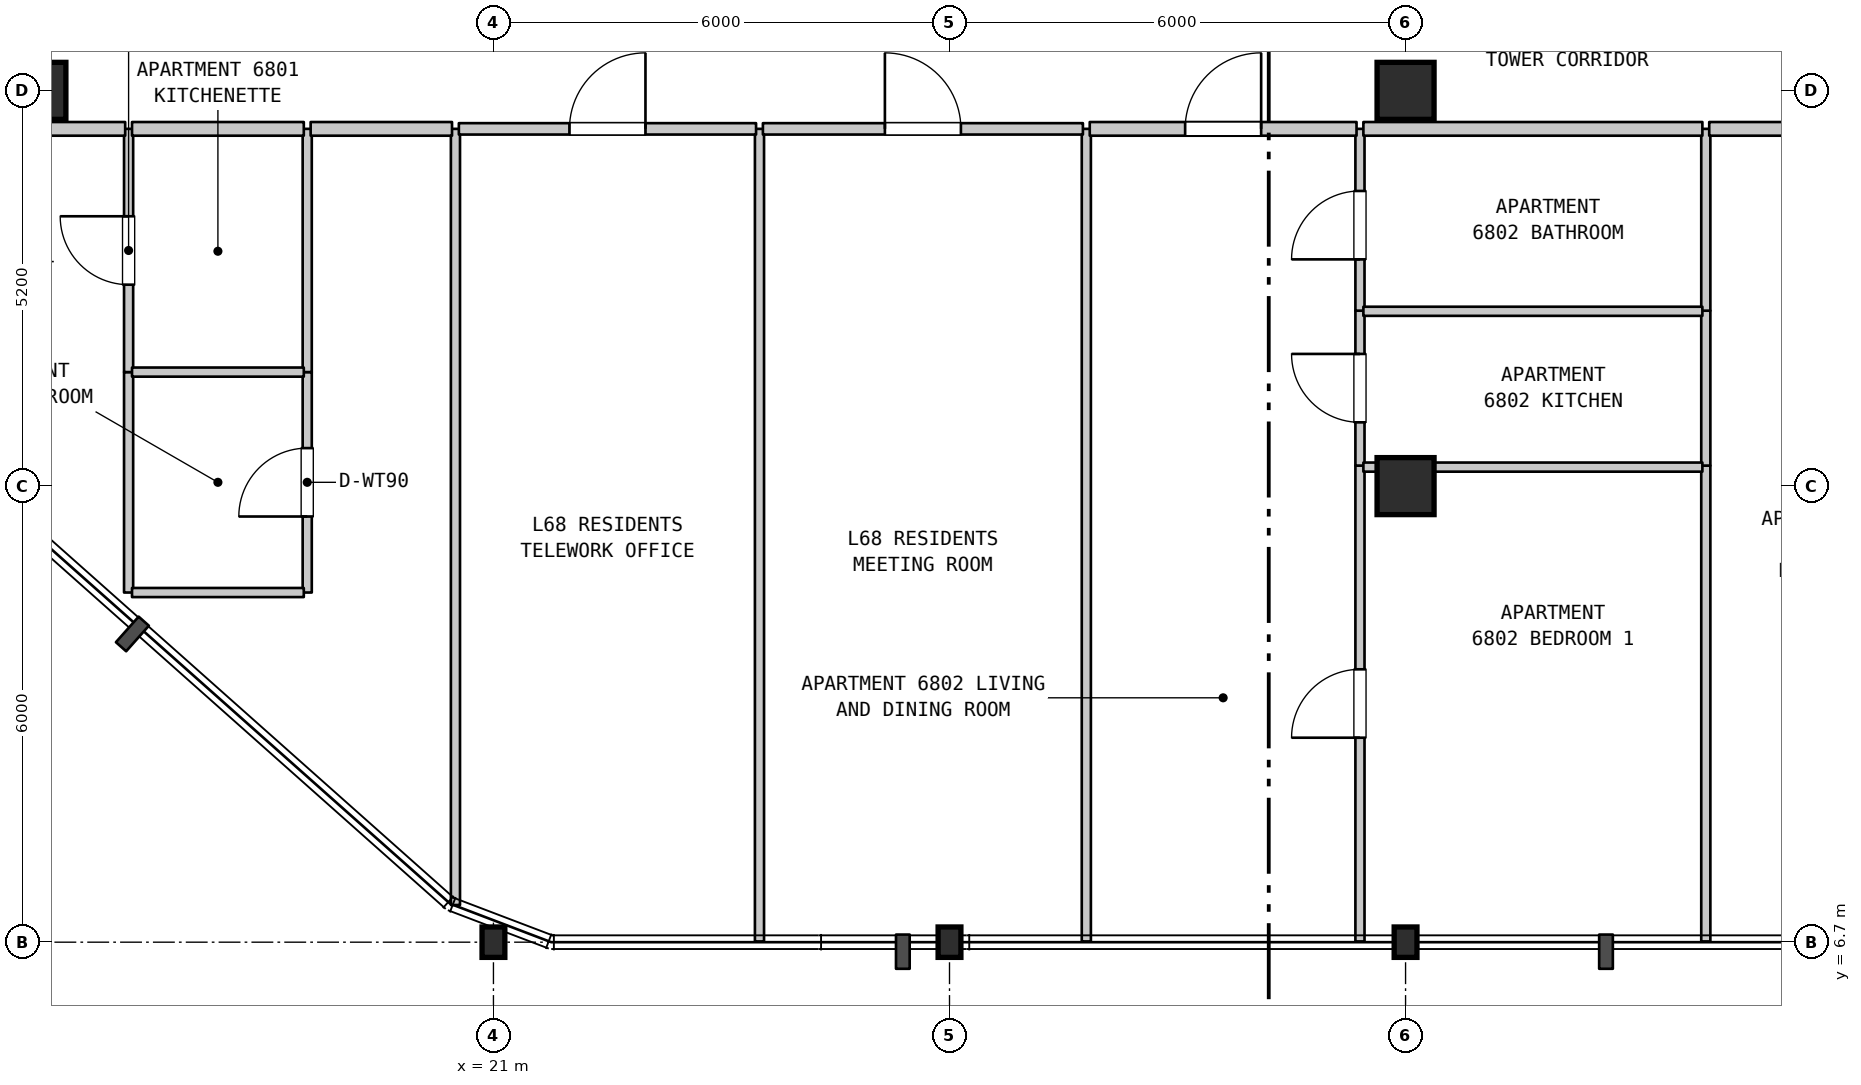
"""IFC4 building model, lengths in metres.
Left out: names, types, materials, properties, quantities, classifications, styles, units other than length and angle.
Written with IfcOpenShell. Run it as: python <this file> out.ifc"""

import sys

from ifc_helpers import new_model, si_unit, direction, frame, frame_2d, origin, origin_2d, place, context, subcontext, project, spatial, rectangle, i_section, extrude, element, fill, save


model = new_model("IFC4")
c1 = context("Model", 3, precision=1e-05, world=origin(), true_north=direction((0.0, 1.0)))
c2 = subcontext(c1, "Body", "Model", "MODEL_VIEW")
j1 = project(units=[si_unit("LENGTHUNIT", "METRE"), si_unit("PLANEANGLEUNIT", "RADIAN")], contexts=[c1])
p1 = place(None, origin())
s1 = spatial("IfcSite", under=j1, at=p1, CompositionType="ELEMENT")
p2 = place(p1, origin())
s2 = spatial("IfcBuilding", under=s1, at=p2, CompositionType="ELEMENT")
p3 = place(p2, frame((0.0, 0.0, 273.2)))
s3 = spatial("IfcBuildingStorey", under=s2, at=p3, CompositionType="ELEMENT", Elevation=273.2)
p4 = place(p3, frame((15.0, 17.9, 0.0), z_axis=(0.0, 0.0, 1.0), x_axis=(1.0, 0.0, 0.0)))
e1 = element("IfcColumn", 1, at=p4, inside=s3, PredefinedType="COLUMN", context=c2, shape_type="SweptSolid", body=[
    extrude(rectangle(XDim=0.75, YDim=0.75, at=origin_2d()), origin(), (0.0, 0.0, 1.0), 3.7),
])
for number, where, z_axis, x_axis in (
    (2, (21.0, 6.7, 0.0), (0.0, 0.0, 1.0), (1.0, 0.0, 0.0)),
    (3, (27.0, 6.7, 0.0), (0.0, 0.0, 1.0), (1.0, 0.0, 0.0)),
    (4, (33.0, 6.7, 0.0), (0.0, 0.0, 1.0), (1.0, 0.0, 0.0)),
):
    element("IfcColumn", number, at=place(p3, frame(where, z_axis=z_axis, x_axis=x_axis)), inside=s3, PredefinedType="COLUMN", context=c2, shape_type="SweptSolid", body=[
        extrude(i_section(OverallWidth=0.3, OverallDepth=0.4, WebThickness=0.013, FlangeThickness=0.024, FilletRadius=0.027, at=origin_2d()), origin(), (0.0, 0.0, 1.0), 3.7),
    ])
for number, where, z_axis, x_axis in (
    (5, (33.0, 12.7, 0.0), (0.0, 0.0, 1.0), (1.0, 0.0, 0.0)),
    (6, (33.0, 17.9, 0.0), (0.0, 0.0, 1.0), (1.0, 0.0, 0.0)),
):
    element("IfcColumn", number, at=place(p3, frame(where, z_axis=z_axis, x_axis=x_axis)), inside=s3, PredefinedType="COLUMN", context=c2, shape_type="SweptSolid", body=[
        extrude(rectangle(XDim=0.75, YDim=0.75, at=origin_2d()), origin(), (0.0, 0.0, 1.0), 3.7),
    ])
p5 = place(p3, frame((16.2, 11.3, 0.0), z_axis=(0.0, 0.0, 1.0), x_axis=(0.0, 1.0, 0.0)))
e7 = element("IfcWall", 7, at=p5, inside=s3, PredefinedType="PARTITIONING", context=c2, shape_type="SweptSolid", body=[
    extrude(rectangle(XDim=2.9, YDim=0.12, at=frame_2d((1.45, 0.0))), origin(), (0.0, 0.0, 1.0), 3.39),
])
p6 = place(p3, frame((16.2, 14.2, 0.0), z_axis=(0.0, 0.0, 1.0), x_axis=(0.0, 1.0, 0.0)))
e8 = element("IfcWall", 8, at=p6, inside=s3, PredefinedType="PARTITIONING", context=c2, shape_type="SweptSolid", body=[
    extrude(rectangle(XDim=3.2, YDim=0.12, at=frame_2d((1.6, 0.0))), origin(), (0.0, 0.0, 1.0), 3.39),
])
p7 = place(p6, frame((1.15, 0.0, 0.0)))
e9 = element("IfcOpeningElement", 9, at=p7, cuts=e8, PredefinedType="OPENING", context=c2, shape_type="SweptSolid", body=[
    extrude(rectangle(XDim=0.9, YDim=2.15, at=frame_2d((0.45, 1.075))), frame((0.0, 0.07, 0.0), z_axis=(0.0, -1.0, 0.0), x_axis=(1.0, 0.0, 0.0)), (0.0, 0.0, 1.0), 0.14),
])
p8 = place(p3, frame((18.55, 11.3, 0.0), z_axis=(0.0, 0.0, 1.0), x_axis=(0.0, 1.0, 0.0)))
e10 = element("IfcWall", 10, at=p8, inside=s3, PredefinedType="PARTITIONING", context=c2, shape_type="SweptSolid", body=[
    extrude(rectangle(XDim=2.9, YDim=0.12, at=frame_2d((1.45, 0.0))), origin(), (0.0, 0.0, 1.0), 3.39),
])
p9 = place(p8, frame((1.0, 0.0, 0.0)))
e11 = element("IfcOpeningElement", 11, at=p9, cuts=e10, PredefinedType="OPENING", context=c2, shape_type="SweptSolid", body=[
    extrude(rectangle(XDim=0.9, YDim=2.1, at=frame_2d((0.45, 1.05))), frame((0.0, 0.07, 0.0), z_axis=(0.0, -1.0, 0.0), x_axis=(1.0, 0.0, 0.0)), (0.0, 0.0, 1.0), 0.14),
])
p10 = place(p3, frame((18.55, 14.2, 0.0), z_axis=(0.0, 0.0, 1.0), x_axis=(0.0, 1.0, 0.0)))
e12 = element("IfcWall", 12, at=p10, inside=s3, PredefinedType="PARTITIONING", context=c2, shape_type="SweptSolid", body=[
    extrude(rectangle(XDim=3.2, YDim=0.12, at=frame_2d((1.6, 0.0))), origin(), (0.0, 0.0, 1.0), 3.39),
])
p11 = place(p3, frame((20.5, 7.189, 0.0), z_axis=(0.0, 0.0, 1.0), x_axis=(0.0, 1.0, 0.0)))
e13 = element("IfcWall", 13, at=p11, inside=s3, PredefinedType="PARTITIONING", context=c2, shape_type="SweptSolid", body=[
    extrude(rectangle(XDim=10.211, YDim=0.12, at=frame_2d((5.105, 0.0))), origin(), (0.0, 0.0, 1.0), 3.39),
])
for number, where, z_axis, x_axis in (
    (14, (24.5, 6.71, 0.0), (0.0, 0.0, 1.0), (0.0, 1.0, 0.0)),
    (15, (28.8, 6.71, 0.0), (0.0, 0.0, 1.0), (0.0, 1.0, 0.0)),
):
    element("IfcWall", number, at=place(p3, frame(where, z_axis=z_axis, x_axis=x_axis)), inside=s3, PredefinedType="PARTITIONING", context=c2, shape_type="SweptSolid", body=[
        extrude(rectangle(XDim=10.69, YDim=0.12, at=frame_2d((5.345, 0.0))), origin(), (0.0, 0.0, 1.0), 3.39),
    ])
p12 = place(p3, frame((32.4, 6.71, 0.0), z_axis=(0.0, 0.0, 1.0), x_axis=(0.0, 1.0, 0.0)))
e16 = element("IfcWall", 16, at=p12, inside=s3, PredefinedType="PARTITIONING", context=c2, shape_type="SweptSolid", body=[
    extrude(rectangle(XDim=6.26, YDim=0.12, at=frame_2d((3.13, 0.0))), origin(), (0.0, 0.0, 1.0), 3.39),
])
p13 = place(p12, frame((2.68, 0.0, 0.0)))
e17 = element("IfcOpeningElement", 17, at=p13, cuts=e16, PredefinedType="OPENING", context=c2, shape_type="SweptSolid", body=[
    extrude(rectangle(XDim=0.9, YDim=2.15, at=frame_2d((0.45, 1.075))), frame((0.0, 0.07, 0.0), z_axis=(0.0, -1.0, 0.0), x_axis=(1.0, 0.0, 0.0)), (0.0, 0.0, 1.0), 0.14),
])
p14 = place(p3, frame((32.4, 12.97, 0.0), z_axis=(0.0, 0.0, 1.0), x_axis=(0.0, 1.0, 0.0)))
e18 = element("IfcWall", 18, at=p14, inside=s3, PredefinedType="PARTITIONING", context=c2, shape_type="SweptSolid", body=[
    extrude(rectangle(XDim=2.038, YDim=0.12, at=frame_2d((1.019, 0.0))), origin(), (0.0, 0.0, 1.0), 3.39),
])
p15 = place(p14, frame((0.569, 0.0, 0.0)))
e19 = element("IfcOpeningElement", 19, at=p15, cuts=e18, PredefinedType="OPENING", context=c2, shape_type="SweptSolid", body=[
    extrude(rectangle(XDim=0.9, YDim=2.15, at=frame_2d((0.45, 1.075))), frame((0.0, 0.07, 0.0), z_axis=(0.0, -1.0, 0.0), x_axis=(1.0, 0.0, 0.0)), (0.0, 0.0, 1.0), 0.14),
])
p16 = place(p3, frame((32.4, 15.008, 0.0), z_axis=(0.0, 0.0, 1.0), x_axis=(0.0, 1.0, 0.0)))
e20 = element("IfcWall", 20, at=p16, inside=s3, PredefinedType="PARTITIONING", context=c2, shape_type="SweptSolid", body=[
    extrude(rectangle(XDim=2.392, YDim=0.12, at=frame_2d((1.196, 0.0))), origin(), (0.0, 0.0, 1.0), 3.39),
])
p17 = place(p16, frame((0.675, 0.0, 0.0)))
e21 = element("IfcOpeningElement", 21, at=p17, cuts=e20, PredefinedType="OPENING", context=c2, shape_type="SweptSolid", body=[
    extrude(rectangle(XDim=0.9, YDim=2.1, at=frame_2d((0.45, 1.05))), frame((0.0, 0.07, 0.0), z_axis=(0.0, -1.0, 0.0), x_axis=(1.0, 0.0, 0.0)), (0.0, 0.0, 1.0), 0.14),
])
p18 = place(p3, frame((36.95, 6.71, 0.0), z_axis=(0.0, 0.0, 1.0), x_axis=(0.0, 1.0, 0.0)))
e22 = element("IfcWall", 22, at=p18, inside=s3, PredefinedType="PARTITIONING", context=c2, shape_type="SweptSolid", body=[
    extrude(rectangle(XDim=6.26, YDim=0.12, at=frame_2d((3.13, 0.0))), origin(), (0.0, 0.0, 1.0), 3.39),
])
p19 = place(p3, frame((36.95, 12.97, 0.0), z_axis=(0.0, 0.0, 1.0), x_axis=(0.0, 1.0, 0.0)))
e23 = element("IfcWall", 23, at=p19, inside=s3, PredefinedType="PARTITIONING", context=c2, shape_type="SweptSolid", body=[
    extrude(rectangle(XDim=2.038, YDim=0.12, at=frame_2d((1.019, 0.0))), origin(), (0.0, 0.0, 1.0), 3.39),
])
p20 = place(p3, frame((36.95, 15.008, 0.0), z_axis=(0.0, 0.0, 1.0), x_axis=(0.0, 1.0, 0.0)))
e24 = element("IfcWall", 24, at=p20, inside=s3, PredefinedType="PARTITIONING", context=c2, shape_type="SweptSolid", body=[
    extrude(rectangle(XDim=2.392, YDim=0.12, at=frame_2d((1.196, 0.0))), origin(), (0.0, 0.0, 1.0), 3.39),
])
p21 = place(p3, frame((16.245, 11.3, 0.0), z_axis=(0.0, 0.0, 1.0), x_axis=(1.0, 0.0, 0.0)))
e25 = element("IfcWall", 25, at=p21, inside=s3, PredefinedType="PARTITIONING", context=c2, shape_type="SweptSolid", body=[
    extrude(rectangle(XDim=2.26, YDim=0.12, at=frame_2d((1.13, 0.0))), origin(), (0.0, 0.0, 1.0), 3.39),
])
p22 = place(p3, frame((32.445, 12.95, 0.0), z_axis=(0.0, 0.0, 1.0), x_axis=(1.0, 0.0, 0.0)))
e26 = element("IfcWall", 26, at=p22, inside=s3, PredefinedType="PARTITIONING", context=c2, shape_type="SweptSolid", body=[
    extrude(rectangle(XDim=4.46, YDim=0.12, at=frame_2d((2.23, 0.0))), origin(), (0.0, 0.0, 1.0), 3.39),
])
p23 = place(p3, frame((16.245, 14.2, 0.0), z_axis=(0.0, 0.0, 1.0), x_axis=(1.0, 0.0, 0.0)))
e27 = element("IfcWall", 27, at=p23, inside=s3, PredefinedType="PARTITIONING", context=c2, shape_type="SweptSolid", body=[
    extrude(rectangle(XDim=2.26, YDim=0.12, at=frame_2d((1.13, 0.0))), origin(), (0.0, 0.0, 1.0), 3.39),
])
p24 = place(p3, frame((32.445, 15.0, 0.0), z_axis=(0.0, 0.0, 1.0), x_axis=(1.0, 0.0, 0.0)))
e28 = element("IfcWall", 28, at=p24, inside=s3, PredefinedType="PARTITIONING", context=c2, shape_type="SweptSolid", body=[
    extrude(rectangle(XDim=4.46, YDim=0.12, at=frame_2d((2.23, 0.0))), origin(), (0.0, 0.0, 1.0), 3.39),
])
p25 = place(p3, frame((12.975, 17.4, 0.0), z_axis=(0.0, 0.0, 1.0), x_axis=(1.0, 0.0, 0.0)))
e29 = element("IfcWall", 29, at=p25, inside=s3, PredefinedType="STANDARD", context=c2, shape_type="SweptSolid", body=[
    extrude(rectangle(XDim=3.18, YDim=0.18, at=frame_2d((1.59, 0.0))), origin(), (0.0, 0.0, 1.0), 3.39),
])
p26 = place(p25, frame((0.332, 0.0, 0.0)))
e30 = element("IfcOpeningElement", 30, at=p26, cuts=e29, PredefinedType="OPENING", context=c2, shape_type="SweptSolid", body=[
    extrude(rectangle(XDim=1.0, YDim=2.15, at=frame_2d((0.5, 1.075))), frame((0.0, 0.1, 0.0), z_axis=(0.0, -1.0, 0.0), x_axis=(1.0, 0.0, 0.0)), (0.0, 0.0, 1.0), 0.2),
])
p27 = place(p3, frame((16.245, 17.4, 0.0), z_axis=(0.0, 0.0, 1.0), x_axis=(1.0, 0.0, 0.0)))
e31 = element("IfcWall", 31, at=p27, inside=s3, PredefinedType="STANDARD", context=c2, shape_type="SweptSolid", body=[
    extrude(rectangle(XDim=2.26, YDim=0.18, at=frame_2d((1.13, 0.0))), origin(), (0.0, 0.0, 1.0), 3.39),
])
p28 = place(p3, frame((18.595, 17.4, 0.0), z_axis=(0.0, 0.0, 1.0), x_axis=(1.0, 0.0, 0.0)))
e32 = element("IfcWall", 32, at=p28, inside=s3, PredefinedType="STANDARD", context=c2, shape_type="SweptSolid", body=[
    extrude(rectangle(XDim=1.86, YDim=0.18, at=frame_2d((0.93, 0.0))), origin(), (0.0, 0.0, 1.0), 3.39),
])
p29 = place(p3, frame((20.545, 17.4, 0.0), z_axis=(0.0, 0.0, 1.0), x_axis=(1.0, 0.0, 0.0)))
e33 = element("IfcWall", 33, at=p29, inside=s3, PredefinedType="STANDARD", context=c2, shape_type="SweptSolid", body=[
    extrude(rectangle(XDim=3.91, YDim=0.15, at=frame_2d((1.955, 0.0))), origin(), (0.0, 0.0, 1.0), 3.39),
])
p30 = place(p29, frame((1.455, 0.0, 0.0)))
e34 = element("IfcOpeningElement", 34, at=p30, cuts=e33, PredefinedType="OPENING", context=c2, shape_type="SweptSolid", body=[
    extrude(rectangle(XDim=1.0, YDim=2.15, at=frame_2d((0.5, 1.075))), frame((0.0, 0.085, 0.0), z_axis=(0.0, -1.0, 0.0), x_axis=(1.0, 0.0, 0.0)), (0.0, 0.0, 1.0), 0.17),
])
p31 = place(p3, frame((24.545, 17.4, 0.0), z_axis=(0.0, 0.0, 1.0), x_axis=(1.0, 0.0, 0.0)))
e35 = element("IfcWall", 35, at=p31, inside=s3, PredefinedType="STANDARD", context=c2, shape_type="SweptSolid", body=[
    extrude(rectangle(XDim=4.21, YDim=0.15, at=frame_2d((2.105, 0.0))), origin(), (0.0, 0.0, 1.0), 3.39),
])
p32 = place(p31, frame((1.605, 0.0, 0.0)))
e36 = element("IfcOpeningElement", 36, at=p32, cuts=e35, PredefinedType="OPENING", context=c2, shape_type="SweptSolid", body=[
    extrude(rectangle(XDim=1.0, YDim=2.15, at=frame_2d((0.5, 1.075))), frame((0.0, 0.085, 0.0), z_axis=(0.0, -1.0, 0.0), x_axis=(1.0, 0.0, 0.0)), (0.0, 0.0, 1.0), 0.17),
])
p33 = place(p3, frame((28.845, 17.4, 0.0), z_axis=(0.0, 0.0, 1.0), x_axis=(1.0, 0.0, 0.0)))
e37 = element("IfcWall", 37, at=p33, inside=s3, PredefinedType="STANDARD", context=c2, shape_type="SweptSolid", body=[
    extrude(rectangle(XDim=3.51, YDim=0.18, at=frame_2d((1.755, 0.0))), origin(), (0.0, 0.0, 1.0), 3.39),
])
p34 = place(p33, frame((1.255, 0.0, 0.0)))
e38 = element("IfcOpeningElement", 38, at=p34, cuts=e37, PredefinedType="OPENING", context=c2, shape_type="SweptSolid", body=[
    extrude(rectangle(XDim=1.0, YDim=2.15, at=frame_2d((0.5, 1.075))), frame((0.0, 0.1, 0.0), z_axis=(0.0, -1.0, 0.0), x_axis=(1.0, 0.0, 0.0)), (0.0, 0.0, 1.0), 0.2),
])
p35 = place(p3, frame((32.445, 17.4, 0.0), z_axis=(0.0, 0.0, 1.0), x_axis=(1.0, 0.0, 0.0)))
e39 = element("IfcWall", 39, at=p35, inside=s3, PredefinedType="STANDARD", context=c2, shape_type="SweptSolid", body=[
    extrude(rectangle(XDim=4.46, YDim=0.18, at=frame_2d((2.23, 0.0))), origin(), (0.0, 0.0, 1.0), 3.39),
])
p36 = place(p3, frame((36.995, 17.4, 0.0), z_axis=(0.0, 0.0, 1.0), x_axis=(1.0, 0.0, 0.0)))
e40 = element("IfcWall", 40, at=p36, inside=s3, PredefinedType="STANDARD", context=c2, shape_type="SweptSolid", body=[
    extrude(rectangle(XDim=3.51, YDim=0.18, at=frame_2d((1.755, 0.0))), origin(), (0.0, 0.0, 1.0), 3.39),
])
p37 = place(p36, frame((1.255, 0.0, 0.0)))
e41 = element("IfcOpeningElement", 41, at=p37, cuts=e40, PredefinedType="OPENING", context=c2, shape_type="SweptSolid", body=[
    extrude(rectangle(XDim=1.0, YDim=2.15, at=frame_2d((0.5, 1.075))), frame((0.0, 0.1, 0.0), z_axis=(0.0, -1.0, 0.0), x_axis=(1.0, 0.0, 0.0)), (0.0, 0.0, 1.0), 0.2),
])
p38 = place(p7, origin())
e42 = element("IfcDoor", 42, at=p38, inside=s3, OperationType="SINGLE_SWING_RIGHT", PredefinedType="DOOR", context=c2, shape_type="SweptSolid", body=[
    extrude(rectangle(XDim=0.9, YDim=2.15, at=frame_2d((0.45, 1.075))), frame((0.0, 0.025, 0.0), z_axis=(0.0, -1.0, 0.0), x_axis=(1.0, 0.0, 0.0)), (0.0, 0.0, 1.0), 0.05),
])
fill(e9, e42)
p39 = place(p9, origin())
e43 = element("IfcDoor", 43, at=p39, inside=s3, OperationType="SINGLE_SWING_LEFT", PredefinedType="DOOR", context=c2, shape_type="SweptSolid", body=[
    extrude(rectangle(XDim=0.9, YDim=2.1, at=frame_2d((0.45, 1.05))), frame((0.0, 0.025, 0.0), z_axis=(0.0, -1.0, 0.0), x_axis=(1.0, 0.0, 0.0)), (0.0, 0.0, 1.0), 0.05),
])
fill(e11, e43)
p40 = place(p13, origin())
e44 = element("IfcDoor", 44, at=p40, inside=s3, OperationType="SINGLE_SWING_LEFT", PredefinedType="DOOR", context=c2, shape_type="SweptSolid", body=[
    extrude(rectangle(XDim=0.9, YDim=2.15, at=frame_2d((0.45, 1.075))), frame((0.0, 0.025, 0.0), z_axis=(0.0, -1.0, 0.0), x_axis=(1.0, 0.0, 0.0)), (0.0, 0.0, 1.0), 0.05),
])
fill(e17, e44)
p41 = place(p15, origin())
e45 = element("IfcDoor", 45, at=p41, inside=s3, OperationType="SINGLE_SWING_RIGHT", PredefinedType="DOOR", context=c2, shape_type="SweptSolid", body=[
    extrude(rectangle(XDim=0.9, YDim=2.15, at=frame_2d((0.45, 1.075))), frame((0.0, 0.025, 0.0), z_axis=(0.0, -1.0, 0.0), x_axis=(1.0, 0.0, 0.0)), (0.0, 0.0, 1.0), 0.05),
])
fill(e19, e45)
p42 = place(p17, origin())
e46 = element("IfcDoor", 46, at=p42, inside=s3, OperationType="SINGLE_SWING_LEFT", PredefinedType="DOOR", context=c2, shape_type="SweptSolid", body=[
    extrude(rectangle(XDim=0.9, YDim=2.1, at=frame_2d((0.45, 1.05))), frame((0.0, 0.025, 0.0), z_axis=(0.0, -1.0, 0.0), x_axis=(1.0, 0.0, 0.0)), (0.0, 0.0, 1.0), 0.05),
])
fill(e21, e46)
p43 = place(p30, origin())
e47 = element("IfcDoor", 47, at=p43, inside=s3, OperationType="SINGLE_SWING_RIGHT", PredefinedType="DOOR", context=c2, shape_type="SweptSolid", body=[
    extrude(rectangle(XDim=1.0, YDim=2.15, at=frame_2d((0.5, 1.075))), frame((0.0, 0.025, 0.0), z_axis=(0.0, -1.0, 0.0), x_axis=(1.0, 0.0, 0.0)), (0.0, 0.0, 1.0), 0.05),
])
fill(e34, e47)
p44 = place(p32, origin())
e48 = element("IfcDoor", 48, at=p44, inside=s3, OperationType="SINGLE_SWING_LEFT", PredefinedType="DOOR", context=c2, shape_type="SweptSolid", body=[
    extrude(rectangle(XDim=1.0, YDim=2.15, at=frame_2d((0.5, 1.075))), frame((0.0, 0.025, 0.0), z_axis=(0.0, -1.0, 0.0), x_axis=(1.0, 0.0, 0.0)), (0.0, 0.0, 1.0), 0.05),
])
fill(e36, e48)
p45 = place(p34, origin())
e49 = element("IfcDoor", 49, at=p45, inside=s3, OperationType="SINGLE_SWING_RIGHT", PredefinedType="DOOR", context=c2, shape_type="SweptSolid", body=[
    extrude(rectangle(XDim=1.0, YDim=2.15, at=frame_2d((0.5, 1.075))), frame((0.0, 0.025, 0.0), z_axis=(0.0, -1.0, 0.0), x_axis=(1.0, 0.0, 0.0)), (0.0, 0.0, 1.0), 0.05),
])
fill(e38, e49)
save(model, sys.argv[1])
